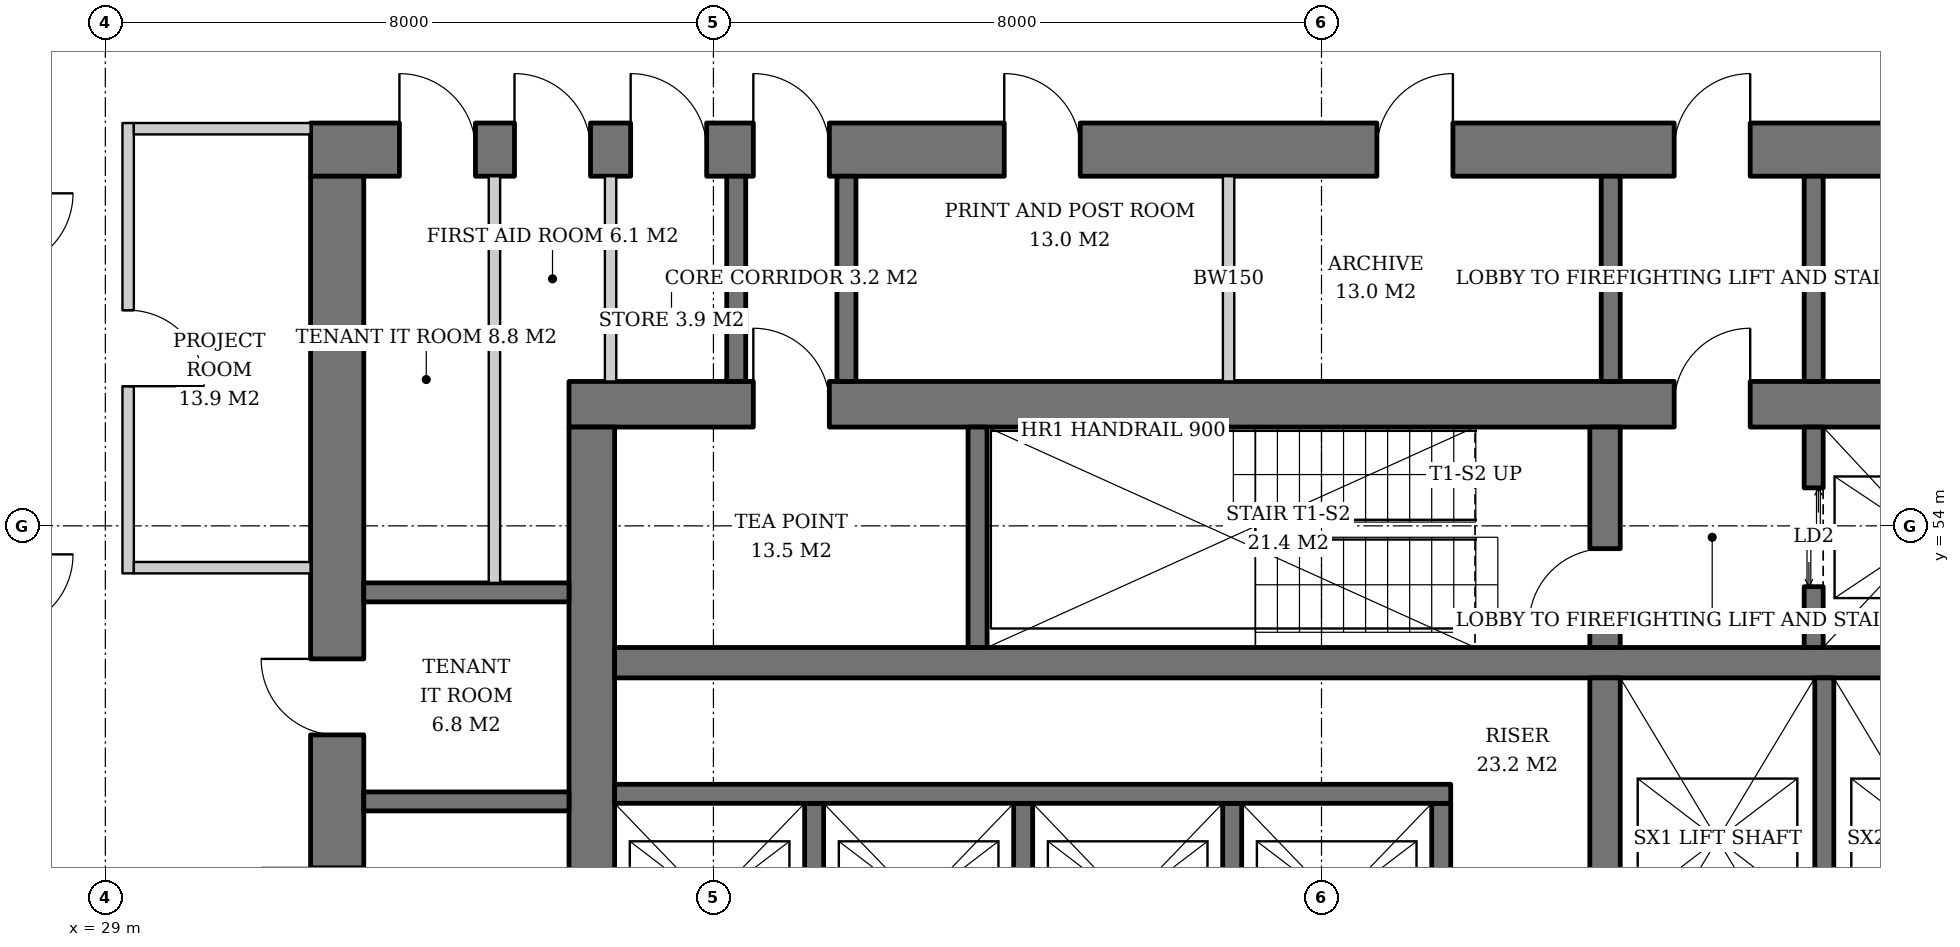
"""IFC4 building model, lengths in metres.
Left out: names, types, materials, properties, quantities, classifications, styles, units other than length and angle.
Written with IfcOpenShell. Run it as: python <this file> out.ifc"""

import sys

from ifc_helpers import new_model, si_unit, direction, frame, frame_2d, origin, place, context, subcontext, project, spatial, rectangle, extrude, element, fill, save


model = new_model("IFC4")
c1 = context("Model", 3, precision=1e-05, world=origin(), true_north=direction((0.0, 1.0)))
c2 = subcontext(c1, "Body", "Model", "MODEL_VIEW")
j1 = project(units=[si_unit("LENGTHUNIT", "METRE"), si_unit("PLANEANGLEUNIT", "RADIAN")], contexts=[c1])
p1 = place(None, origin())
s1 = spatial("IfcSite", under=j1, at=p1, CompositionType="ELEMENT")
p2 = place(p1, origin())
s2 = spatial("IfcBuilding", under=s1, at=p2, CompositionType="ELEMENT")
p3 = place(p2, frame((0.0, 0.0, 112.2)))
s3 = spatial("IfcBuildingStorey", under=s2, at=p3, CompositionType="ELEMENT", Elevation=112.2)
p4 = place(p3, frame((35.1, 55.6, 0.0), z_axis=(0.0, 0.0, 1.0), x_axis=(1.0, 0.0, 0.0)))
e1 = element("IfcWall", 1, at=p4, inside=s3, PredefinedType="SHEAR", context=c2, shape_type="SweptSolid", body=[
    extrude(rectangle(XDim=19.8, YDim=0.6, at=frame_2d((9.9, 0.0))), origin(), (0.0, 0.0, 1.0), 3.8),
])
p5 = place(p4, frame((14.54, 0.0, 0.0)))
e2 = element("IfcOpeningElement", 2, at=p5, cuts=e1, PredefinedType="OPENING", context=c2, shape_type="SweptSolid", body=[
    extrude(rectangle(XDim=1.0, YDim=2.1, at=frame_2d((0.5, 1.05))), frame((0.0, 0.31, 0.0), z_axis=(0.0, -1.0, 0.0), x_axis=(1.0, 0.0, 0.0)), (0.0, 0.0, 1.0), 0.62),
])
p6 = place(p4, frame((2.425, 0.0, 0.0)))
e3 = element("IfcOpeningElement", 3, at=p6, cuts=e1, PredefinedType="OPENING", context=c2, shape_type="SweptSolid", body=[
    extrude(rectangle(XDim=1.0, YDim=2.1, at=frame_2d((0.5, 1.05))), frame((0.0, 0.31, 0.0), z_axis=(0.0, -1.0, 0.0), x_axis=(1.0, 0.0, 0.0)), (0.0, 0.0, 1.0), 0.62),
])
p7 = place(p3, frame((35.4, 36.7, 0.0), z_axis=(0.0, 0.0, 1.0), x_axis=(0.0, 1.0, 0.0)))
e4 = element("IfcWall", 4, at=p7, inside=s3, PredefinedType="SHEAR", context=c2, shape_type="SweptSolid", body=[
    extrude(rectangle(XDim=18.6, YDim=0.6, at=frame_2d((9.3, 0.0))), origin(), (0.0, 0.0, 1.0), 3.8),
])
p8 = place(p7, frame((8.4, 0.0, 0.0)))
e5 = element("IfcOpeningElement", 5, at=p8, cuts=e4, PredefinedType="OPENING", context=c2, shape_type="SweptSolid", body=[
    extrude(rectangle(XDim=1.8, YDim=2.4, at=frame_2d((0.9, 1.2))), frame((0.0, 0.31, 0.0), z_axis=(0.0, -1.0, 0.0), x_axis=(1.0, 0.0, 0.0)), (0.0, 0.0, 1.0), 0.62),
])
p9 = place(p3, frame((31.7, 58.95, 0.0), z_axis=(0.0, 0.0, 1.0), x_axis=(1.0, 0.0, 0.0)))
e6 = element("IfcWall", 6, at=p9, inside=s3, PredefinedType="SHEAR", context=c2, shape_type="SweptSolid", body=[
    extrude(rectangle(XDim=26.6, YDim=0.7, at=frame_2d((13.3, 0.0))), origin(), (0.0, 0.0, 1.0), 3.8),
])
p10 = place(p9, frame((17.94, 0.0, 0.0)))
e7 = element("IfcOpeningElement", 7, at=p10, cuts=e6, PredefinedType="OPENING", context=c2, shape_type="SweptSolid", body=[
    extrude(rectangle(XDim=1.0, YDim=2.1, at=frame_2d((0.5, 1.05))), frame((0.0, 0.36, 0.0), z_axis=(0.0, -1.0, 0.0), x_axis=(1.0, 0.0, 0.0)), (0.0, 0.0, 1.0), 0.72),
])
p11 = place(p9, frame((5.825, 0.0, 0.0)))
e8 = element("IfcOpeningElement", 8, at=p11, cuts=e6, PredefinedType="OPENING", context=c2, shape_type="SweptSolid", body=[
    extrude(rectangle(XDim=1.0, YDim=2.1, at=frame_2d((0.5, 1.05))), frame((0.0, 0.36, 0.0), z_axis=(0.0, -1.0, 0.0), x_axis=(1.0, 0.0, 0.0)), (0.0, 0.0, 1.0), 0.72),
])
p12 = place(p9, frame((1.169, 0.0, 0.0)))
e9 = element("IfcOpeningElement", 9, at=p12, cuts=e6, PredefinedType="OPENING", context=c2, shape_type="SweptSolid", body=[
    extrude(rectangle(XDim=1.0, YDim=2.1, at=frame_2d((0.5, 1.05))), frame((0.0, 0.36, 0.0), z_axis=(0.0, -1.0, 0.0), x_axis=(1.0, 0.0, 0.0)), (0.0, 0.0, 1.0), 0.72),
])
p13 = place(p9, frame((2.683, 0.0, 0.0)))
e10 = element("IfcOpeningElement", 10, at=p13, cuts=e6, PredefinedType="OPENING", context=c2, shape_type="SweptSolid", body=[
    extrude(rectangle(XDim=1.0, YDim=2.1, at=frame_2d((0.5, 1.05))), frame((0.0, 0.36, 0.0), z_axis=(0.0, -1.0, 0.0), x_axis=(1.0, 0.0, 0.0)), (0.0, 0.0, 1.0), 0.72),
])
p14 = place(p9, frame((4.211, 0.0, 0.0)))
e11 = element("IfcOpeningElement", 11, at=p14, cuts=e6, PredefinedType="OPENING", context=c2, shape_type="SweptSolid", body=[
    extrude(rectangle(XDim=1.0, YDim=2.1, at=frame_2d((0.5, 1.05))), frame((0.0, 0.36, 0.0), z_axis=(0.0, -1.0, 0.0), x_axis=(1.0, 0.0, 0.0)), (0.0, 0.0, 1.0), 0.72),
])
p15 = place(p9, frame((9.126, 0.0, 0.0)))
e12 = element("IfcOpeningElement", 12, at=p15, cuts=e6, PredefinedType="OPENING", context=c2, shape_type="SweptSolid", body=[
    extrude(rectangle(XDim=1.0, YDim=2.1, at=frame_2d((0.5, 1.05))), frame((0.0, 0.36, 0.0), z_axis=(0.0, -1.0, 0.0), x_axis=(1.0, 0.0, 0.0)), (0.0, 0.0, 1.0), 0.72),
])
p16 = place(p9, frame((14.029, 0.0, 0.0)))
e13 = element("IfcOpeningElement", 13, at=p16, cuts=e6, PredefinedType="OPENING", context=c2, shape_type="SweptSolid", body=[
    extrude(rectangle(XDim=1.0, YDim=2.1, at=frame_2d((0.5, 1.05))), frame((0.0, 0.36, 0.0), z_axis=(0.0, -1.0, 0.0), x_axis=(1.0, 0.0, 0.0)), (0.0, 0.0, 1.0), 0.72),
])
p17 = place(p9, frame((22.4, 0.0, 0.0)))
e14 = element("IfcOpeningElement", 14, at=p17, cuts=e6, PredefinedType="OPENING", context=c2, shape_type="SweptSolid", body=[
    extrude(rectangle(XDim=1.0, YDim=2.1, at=frame_2d((0.5, 1.05))), frame((0.0, 0.36, 0.0), z_axis=(0.0, -1.0, 0.0), x_axis=(1.0, 0.0, 0.0)), (0.0, 0.0, 1.0), 0.72),
])
p18 = place(p3, frame((32.05, 33.4, 0.0), z_axis=(0.0, 0.0, 1.0), x_axis=(0.0, 1.0, 0.0)))
e15 = element("IfcWall", 15, at=p18, inside=s3, PredefinedType="SHEAR", context=c2, shape_type="SweptSolid", body=[
    extrude(rectangle(XDim=25.2, YDim=0.7, at=frame_2d((12.6, 0.0))), origin(), (0.0, 0.0, 1.0), 3.8),
])
p19 = place(p18, frame((11.7, 0.0, 0.0)))
e16 = element("IfcOpeningElement", 16, at=p19, cuts=e15, PredefinedType="OPENING", context=c2, shape_type="SweptSolid", body=[
    extrude(rectangle(XDim=1.8, YDim=2.4, at=frame_2d((0.9, 1.2))), frame((0.0, 0.36, 0.0), z_axis=(0.0, -1.0, 0.0), x_axis=(1.0, 0.0, 0.0)), (0.0, 0.0, 1.0), 0.72),
])
p20 = place(p18, frame((3.6, 0.0, 0.0)))
e17 = element("IfcOpeningElement", 17, at=p20, cuts=e15, PredefinedType="OPENING", context=c2, shape_type="SweptSolid", body=[
    extrude(rectangle(XDim=1.0, YDim=2.1, at=frame_2d((0.5, 1.05))), frame((0.0, 0.36, 0.0), z_axis=(0.0, -1.0, 0.0), x_axis=(1.0, 0.0, 0.0)), (0.0, 0.0, 1.0), 0.72),
])
p21 = place(p18, frame((6.35, 0.0, 0.0)))
e18 = element("IfcOpeningElement", 18, at=p21, cuts=e15, PredefinedType="OPENING", context=c2, shape_type="SweptSolid", body=[
    extrude(rectangle(XDim=1.0, YDim=2.1, at=frame_2d((0.5, 1.05))), frame((0.0, 0.36, 0.0), z_axis=(0.0, -1.0, 0.0), x_axis=(1.0, 0.0, 0.0)), (0.0, 0.0, 1.0), 0.72),
])
p22 = place(p18, frame((9.1, 0.0, 0.0)))
e19 = element("IfcOpeningElement", 19, at=p22, cuts=e15, PredefinedType="OPENING", context=c2, shape_type="SweptSolid", body=[
    extrude(rectangle(XDim=1.0, YDim=2.1, at=frame_2d((0.5, 1.05))), frame((0.0, 0.36, 0.0), z_axis=(0.0, -1.0, 0.0), x_axis=(1.0, 0.0, 0.0)), (0.0, 0.0, 1.0), 0.72),
])
p23 = place(p18, frame((15.1, 0.0, 0.0)))
e20 = element("IfcOpeningElement", 20, at=p23, cuts=e15, PredefinedType="OPENING", context=c2, shape_type="SweptSolid", body=[
    extrude(rectangle(XDim=1.0, YDim=2.1, at=frame_2d((0.5, 1.05))), frame((0.0, 0.36, 0.0), z_axis=(0.0, -1.0, 0.0), x_axis=(1.0, 0.0, 0.0)), (0.0, 0.0, 1.0), 0.72),
])
p24 = place(p18, frame((17.85, 0.0, 0.0)))
e21 = element("IfcOpeningElement", 21, at=p24, cuts=e15, PredefinedType="OPENING", context=c2, shape_type="SweptSolid", body=[
    extrude(rectangle(XDim=1.0, YDim=2.1, at=frame_2d((0.5, 1.05))), frame((0.0, 0.36, 0.0), z_axis=(0.0, -1.0, 0.0), x_axis=(1.0, 0.0, 0.0)), (0.0, 0.0, 1.0), 0.72),
])
p25 = place(p3, frame((35.7, 52.2, 0.0), z_axis=(0.0, 0.0, 1.0), x_axis=(1.0, 0.0, 0.0)))
e22 = element("IfcWall", 22, at=p25, inside=s3, PredefinedType="SHEAR", context=c2, shape_type="SweptSolid", body=[
    extrude(rectangle(XDim=18.6, YDim=0.4, at=frame_2d((9.3, 0.0))), origin(), (0.0, 0.0, 1.0), 3.8),
])
p26 = place(p3, frame((48.73, 40.0, 0.0), z_axis=(0.0, 0.0, 1.0), x_axis=(0.0, 1.0, 0.0)))
e23 = element("IfcWall", 23, at=p26, inside=s3, PredefinedType="SHEAR", context=c2, shape_type="SweptSolid", body=[
    extrude(rectangle(XDim=12.0, YDim=0.4, at=frame_2d((6.0, 0.0))), origin(), (0.0, 0.0, 1.0), 3.8),
])
p27 = place(p3, frame((48.73, 52.4, 0.0), z_axis=(0.0, 0.0, 1.0), x_axis=(0.0, 1.0, 0.0)))
e24 = element("IfcWall", 24, at=p27, inside=s3, PredefinedType="SHEAR", context=c2, shape_type="SweptSolid", body=[
    extrude(rectangle(XDim=2.9, YDim=0.4, at=frame_2d((1.45, 0.0))), origin(), (0.0, 0.0, 1.0), 3.8),
])
p28 = place(p27, frame((0.3, 0.0, 0.0)))
e25 = element("IfcOpeningElement", 25, at=p28, cuts=e24, PredefinedType="OPENING", context=c2, shape_type="SweptSolid", body=[
    extrude(rectangle(XDim=1.0, YDim=2.1, at=frame_2d((0.5, 1.05))), frame((0.0, 0.21, 0.0), z_axis=(0.0, -1.0, 0.0), x_axis=(1.0, 0.0, 0.0)), (0.0, 0.0, 1.0), 0.42),
])
p29 = place(p3, frame((40.475, 52.4, 0.0), z_axis=(0.0, 0.0, 1.0), x_axis=(0.0, 1.0, 0.0)))
e26 = element("IfcWall", 26, at=p29, inside=s3, PredefinedType="SHEAR", context=c2, shape_type="SweptSolid", body=[
    extrude(rectangle(XDim=2.9, YDim=0.25, at=frame_2d((1.45, 0.0))), origin(), (0.0, 0.0, 1.0), 3.8),
])
p30 = place(p3, frame((51.475, 52.4, 0.0), z_axis=(0.0, 0.0, 1.0), x_axis=(0.0, 1.0, 0.0)))
e27 = element("IfcWall", 27, at=p30, inside=s3, PredefinedType="SHEAR", context=c2, shape_type="SweptSolid", body=[
    extrude(rectangle(XDim=2.9, YDim=0.25, at=frame_2d((1.45, 0.0))), origin(), (0.0, 0.0, 1.0), 3.8),
])
p31 = place(p30, frame((0.8, 0.0, 0.0)))
e28 = element("IfcOpeningElement", 28, at=p31, cuts=e27, PredefinedType="OPENING", context=c2, shape_type="SweptSolid", body=[
    extrude(rectangle(XDim=1.3, YDim=2.2, at=frame_2d((0.65, 1.1))), frame((0.0, 0.135, 0.0), z_axis=(0.0, -1.0, 0.0), x_axis=(1.0, 0.0, 0.0)), (0.0, 0.0, 1.0), 0.27),
])
for number, where, z_axis, x_axis in (
    (29, (38.325, 47.75, 0.0), (0.0, 0.0, 1.0), (0.0, 1.0, 0.0)),
    (30, (41.075, 47.75, 0.0), (0.0, 0.0, 1.0), (0.0, 1.0, 0.0)),
    (31, (43.825, 47.75, 0.0), (0.0, 0.0, 1.0), (0.0, 1.0, 0.0)),
    (32, (46.575, 47.75, 0.0), (0.0, 0.0, 1.0), (0.0, 1.0, 0.0)),
):
    element("IfcWall", number, at=place(p3, frame(where, z_axis=z_axis, x_axis=x_axis)), inside=s3, PredefinedType="SHEAR", context=c2, shape_type="SweptSolid", body=[
        extrude(rectangle(XDim=2.6, YDim=0.25, at=frame_2d((1.3, 0.0))), origin(), (0.0, 0.0, 1.0), 3.8),
    ])
p32 = place(p3, frame((35.7, 50.475, 0.0), z_axis=(0.0, 0.0, 1.0), x_axis=(1.0, 0.0, 0.0)))
e33 = element("IfcWall", 33, at=p32, inside=s3, PredefinedType="SHEAR", context=c2, shape_type="SweptSolid", body=[
    extrude(rectangle(XDim=11.0, YDim=0.25, at=frame_2d((5.5, 0.0))), origin(), (0.0, 0.0, 1.0), 3.8),
])
p33 = place(p3, frame((51.615, 47.75, 0.0), z_axis=(0.0, 0.0, 1.0), x_axis=(0.0, 1.0, 0.0)))
e34 = element("IfcWall", 34, at=p33, inside=s3, PredefinedType="SHEAR", context=c2, shape_type="SweptSolid", body=[
    extrude(rectangle(XDim=4.25, YDim=0.25, at=frame_2d((2.125, 0.0))), origin(), (0.0, 0.0, 1.0), 3.8),
])
for number, where, z_axis, x_axis in (
    (35, (32.4, 50.375, 0.0), (0.0, 0.0, 1.0), (1.0, 0.0, 0.0)),
    (36, (32.4, 53.125, 0.0), (0.0, 0.0, 1.0), (1.0, 0.0, 0.0)),
):
    element("IfcWall", number, at=place(p3, frame(where, z_axis=z_axis, x_axis=x_axis)), inside=s3, PredefinedType="SHEAR", context=c2, shape_type="SweptSolid", body=[
        extrude(rectangle(XDim=2.7, YDim=0.25, at=frame_2d((1.35, 0.0))), origin(), (0.0, 0.0, 1.0), 3.8),
    ])
for number, where, z_axis, x_axis in (
    (37, (48.805, 55.9, 0.0), (0.0, 0.0, 1.0), (0.0, 1.0, 0.0)),
    (38, (51.475, 55.9, 0.0), (0.0, 0.0, 1.0), (0.0, 1.0, 0.0)),
    (39, (37.3, 55.9, 0.0), (0.0, 0.0, 1.0), (0.0, 1.0, 0.0)),
    (40, (38.75, 55.9, 0.0), (0.0, 0.0, 1.0), (0.0, 1.0, 0.0)),
):
    element("IfcWall", number, at=place(p3, frame(where, z_axis=z_axis, x_axis=x_axis)), inside=s3, PredefinedType="SOLIDWALL", context=c2, shape_type="SweptSolid", body=[
        extrude(rectangle(XDim=2.7, YDim=0.25, at=frame_2d((1.35, 0.0))), origin(), (0.0, 0.0, 1.0), 3.62),
    ])
p34 = place(p3, frame((34.119, 53.25, 0.0), z_axis=(0.0, 0.0, 1.0), x_axis=(0.0, 1.0, 0.0)))
e41 = element("IfcWall", 41, at=p34, inside=s3, PredefinedType="SOLIDWALL", context=c2, shape_type="SweptSolid", body=[
    extrude(rectangle(XDim=5.35, YDim=0.15, at=frame_2d((2.675, 0.0))), origin(), (0.0, 0.0, 1.0), 3.62),
])
for number, where, z_axis, x_axis in (
    (42, (35.647, 55.9, 0.0), (0.0, 0.0, 1.0), (0.0, 1.0, 0.0)),
    (43, (43.778, 55.9, 0.0), (0.0, 0.0, 1.0), (0.0, 1.0, 0.0)),
):
    element("IfcWall", number, at=place(p3, frame(where, z_axis=z_axis, x_axis=x_axis)), inside=s3, PredefinedType="SOLIDWALL", context=c2, shape_type="SweptSolid", body=[
        extrude(rectangle(XDim=2.7, YDim=0.15, at=frame_2d((1.35, 0.0))), origin(), (0.0, 0.0, 1.0), 3.62),
    ])
p35 = place(p3, frame((29.3, 59.3, 0.0), z_axis=(0.0, 0.0, 1.0), x_axis=(0.0, -1.0, 0.0)))
e44 = element("IfcWall", 44, at=p35, inside=s3, PredefinedType="PARTITIONING", context=c2, shape_type="SweptSolid", body=[
    extrude(rectangle(XDim=5.925, YDim=0.15, at=frame_2d((2.962, 0.0))), origin(), (0.0, 0.0, 1.0), 2.72),
])
p36 = place(p35, frame((2.462, 0.0, 0.0)))
e45 = element("IfcOpeningElement", 45, at=p36, cuts=e44, PredefinedType="OPENING", context=c2, shape_type="SweptSolid", body=[
    extrude(rectangle(XDim=1.0, YDim=2.1, at=frame_2d((0.5, 1.05))), frame((0.0, 0.085, 0.0), z_axis=(0.0, -1.0, 0.0), x_axis=(1.0, 0.0, 0.0)), (0.0, 0.0, 1.0), 0.17),
])
for number, where, z_axis, x_axis in (
    (46, (31.7, 59.225, 0.0), (0.0, 0.0, 1.0), (-1.0, 0.0, 0.0)),
    (47, (31.7, 53.45, 0.0), (0.0, 0.0, 1.0), (-1.0, 0.0, 0.0)),
):
    element("IfcWall", number, at=place(p3, frame(where, z_axis=z_axis, x_axis=x_axis)), inside=s3, PredefinedType="PARTITIONING", context=c2, shape_type="SweptSolid", body=[
        extrude(rectangle(XDim=2.325, YDim=0.15, at=frame_2d((1.163, 0.0))), origin(), (0.0, 0.0, 1.0), 3.62),
    ])
p37 = place(p31, origin())
e48 = element("IfcDoor", 48, at=p37, inside=s3, OperationType="DOUBLE_DOOR_SLIDING", PredefinedType="DOOR", context=c2, shape_type="SweptSolid", body=[
    extrude(rectangle(XDim=1.3, YDim=2.2, at=frame_2d((0.65, 1.1))), frame((0.0, 0.025, 0.0), z_axis=(0.0, -1.0, 0.0), x_axis=(1.0, 0.0, 0.0)), (0.0, 0.0, 1.0), 0.05),
])
fill(e28, e48)
p38 = place(p28, origin())
e49 = element("IfcDoor", 49, at=p38, inside=s3, OperationType="SINGLE_SWING_LEFT", PredefinedType="DOOR", context=c2, shape_type="SweptSolid", body=[
    extrude(rectangle(XDim=1.0, YDim=2.1, at=frame_2d((0.5, 1.05))), frame((0.0, 0.025, 0.0), z_axis=(0.0, -1.0, 0.0), x_axis=(1.0, 0.0, 0.0)), (0.0, 0.0, 1.0), 0.05),
])
fill(e25, e49)
p39 = place(p5, origin())
e50 = element("IfcDoor", 50, at=p39, inside=s3, OperationType="SINGLE_SWING_RIGHT", PredefinedType="DOOR", context=c2, shape_type="SweptSolid", body=[
    extrude(rectangle(XDim=1.0, YDim=2.1, at=frame_2d((0.5, 1.05))), frame((0.0, 0.025, 0.0), z_axis=(0.0, -1.0, 0.0), x_axis=(1.0, 0.0, 0.0)), (0.0, 0.0, 1.0), 0.05),
])
fill(e2, e50)
p40 = place(p10, origin())
e51 = element("IfcDoor", 51, at=p40, inside=s3, OperationType="SINGLE_SWING_RIGHT", PredefinedType="DOOR", context=c2, shape_type="SweptSolid", body=[
    extrude(rectangle(XDim=1.0, YDim=2.1, at=frame_2d((0.5, 1.05))), frame((0.0, 0.025, 0.0), z_axis=(0.0, -1.0, 0.0), x_axis=(1.0, 0.0, 0.0)), (0.0, 0.0, 1.0), 0.05),
])
fill(e7, e51)
p41 = place(p11, origin())
e52 = element("IfcDoor", 52, at=p41, inside=s3, OperationType="SINGLE_SWING_LEFT", PredefinedType="DOOR", context=c2, shape_type="SweptSolid", body=[
    extrude(rectangle(XDim=1.0, YDim=2.1, at=frame_2d((0.5, 1.05))), frame((0.0, 0.025, 0.0), z_axis=(0.0, -1.0, 0.0), x_axis=(1.0, 0.0, 0.0)), (0.0, 0.0, 1.0), 0.05),
])
fill(e8, e52)
p42 = place(p6, origin())
e53 = element("IfcDoor", 53, at=p42, inside=s3, OperationType="SINGLE_SWING_LEFT", PredefinedType="DOOR", context=c2, shape_type="SweptSolid", body=[
    extrude(rectangle(XDim=1.0, YDim=2.1, at=frame_2d((0.5, 1.05))), frame((0.0, -0.24, 0.0), z_axis=(0.0, -1.0, 0.0), x_axis=(1.0, 0.0, 0.0)), (0.0, 0.0, 1.0), 0.05),
])
fill(e3, e53)
p43 = place(p24, origin())
e54 = element("IfcDoor", 54, at=p43, inside=s3, OperationType="SINGLE_SWING_RIGHT", PredefinedType="DOOR", context=c2, shape_type="SweptSolid", body=[
    extrude(rectangle(XDim=1.0, YDim=2.1, at=frame_2d((0.5, 1.05))), frame((0.0, -0.29, 0.0), z_axis=(0.0, -1.0, 0.0), x_axis=(1.0, 0.0, 0.0)), (0.0, 0.0, 1.0), 0.05),
])
fill(e21, e54)
p44 = place(p12, origin())
e55 = element("IfcDoor", 55, at=p44, inside=s3, OperationType="SINGLE_SWING_LEFT", PredefinedType="DOOR", context=c2, shape_type="SweptSolid", body=[
    extrude(rectangle(XDim=1.0, YDim=2.1, at=frame_2d((0.5, 1.05))), frame((0.0, -0.29, 0.0), z_axis=(0.0, -1.0, 0.0), x_axis=(1.0, 0.0, 0.0)), (0.0, 0.0, 1.0), 0.05),
])
fill(e9, e55)
p45 = place(p13, origin())
e56 = element("IfcDoor", 56, at=p45, inside=s3, OperationType="SINGLE_SWING_LEFT", PredefinedType="DOOR", context=c2, shape_type="SweptSolid", body=[
    extrude(rectangle(XDim=1.0, YDim=2.1, at=frame_2d((0.5, 1.05))), frame((0.0, -0.29, 0.0), z_axis=(0.0, -1.0, 0.0), x_axis=(1.0, 0.0, 0.0)), (0.0, 0.0, 1.0), 0.05),
])
fill(e10, e56)
p46 = place(p14, origin())
e57 = element("IfcDoor", 57, at=p46, inside=s3, OperationType="SINGLE_SWING_LEFT", PredefinedType="DOOR", context=c2, shape_type="SweptSolid", body=[
    extrude(rectangle(XDim=1.0, YDim=2.1, at=frame_2d((0.5, 1.05))), frame((0.0, -0.29, 0.0), z_axis=(0.0, -1.0, 0.0), x_axis=(1.0, 0.0, 0.0)), (0.0, 0.0, 1.0), 0.05),
])
fill(e11, e57)
p47 = place(p15, origin())
e58 = element("IfcDoor", 58, at=p47, inside=s3, OperationType="SINGLE_SWING_LEFT", PredefinedType="DOOR", context=c2, shape_type="SweptSolid", body=[
    extrude(rectangle(XDim=1.0, YDim=2.1, at=frame_2d((0.5, 1.05))), frame((0.0, -0.29, 0.0), z_axis=(0.0, -1.0, 0.0), x_axis=(1.0, 0.0, 0.0)), (0.0, 0.0, 1.0), 0.05),
])
fill(e12, e58)
p48 = place(p16, origin())
e59 = element("IfcDoor", 59, at=p48, inside=s3, OperationType="SINGLE_SWING_RIGHT", PredefinedType="DOOR", context=c2, shape_type="SweptSolid", body=[
    extrude(rectangle(XDim=1.0, YDim=2.1, at=frame_2d((0.5, 1.05))), frame((0.0, -0.29, 0.0), z_axis=(0.0, -1.0, 0.0), x_axis=(1.0, 0.0, 0.0)), (0.0, 0.0, 1.0), 0.05),
])
fill(e13, e59)
p49 = place(p36, origin())
e60 = element("IfcDoor", 60, at=p49, inside=s3, OperationType="SINGLE_SWING_RIGHT", PredefinedType="DOOR", context=c2, shape_type="SweptSolid", body=[
    extrude(rectangle(XDim=1.0, YDim=2.1, at=frame_2d((0.5, 1.05))), frame((0.0, 0.025, 0.0), z_axis=(0.0, -1.0, 0.0), x_axis=(1.0, 0.0, 0.0)), (0.0, 0.0, 1.0), 0.05),
])
fill(e45, e60)
save(model, sys.argv[1])
